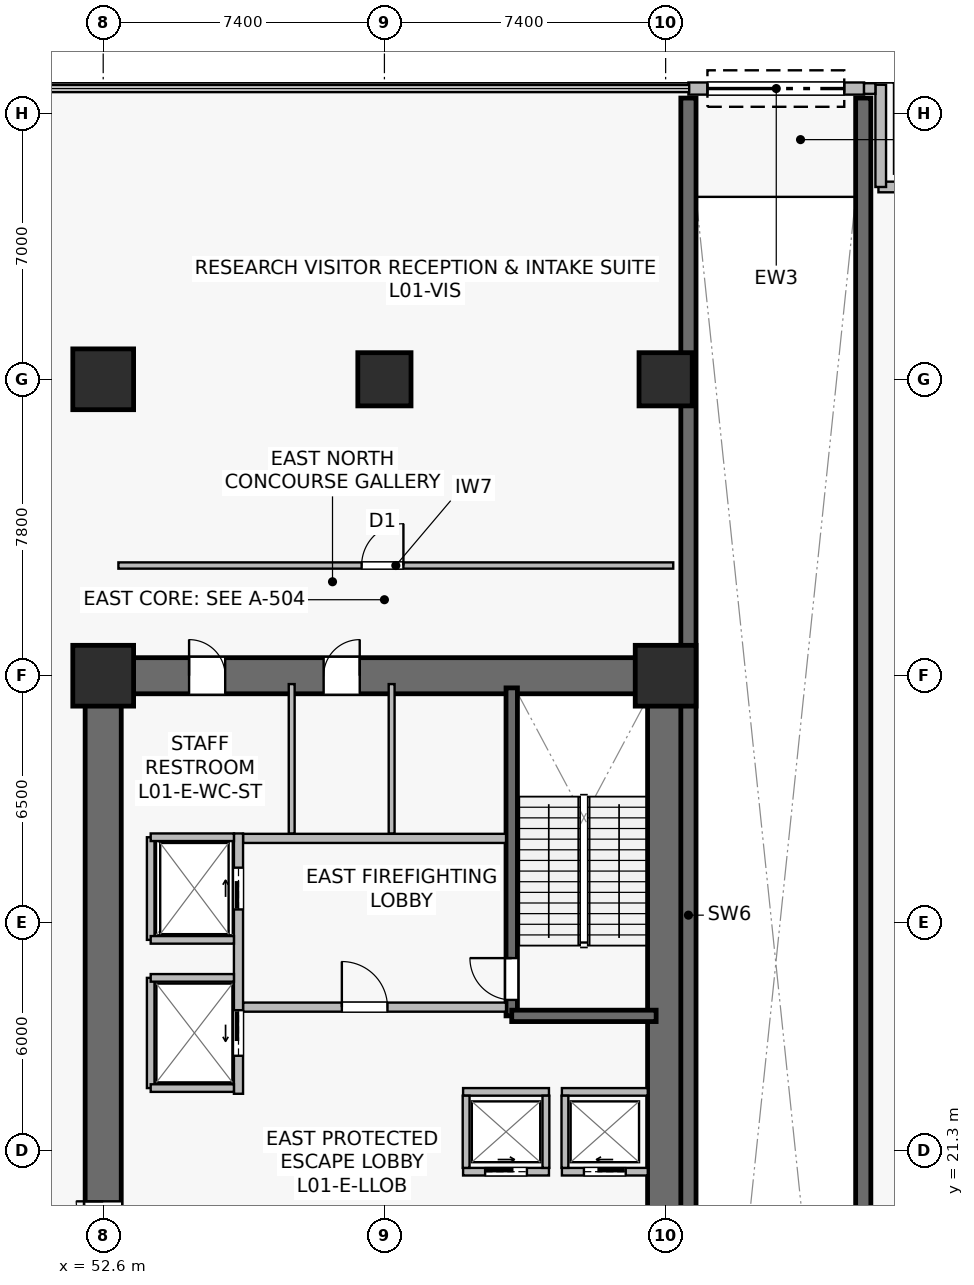
"""IFC4 building model, lengths in metres.
Left out: names, types, materials, properties, quantities, classifications, styles, units other than length and angle.
Written with IfcOpenShell. Run it as: python <this file> out.ifc"""

import sys

from ifc_helpers import new_model, si_unit, direction, frame, frame_2d, origin, origin_2d, place, context, subcontext, project, spatial, rectangle, extrude, source, transform, mapped, element, fill, save


model = new_model("IFC4")
c1 = context("Model", 3, precision=1e-05, world=origin(), true_north=direction((0.0, 1.0)))
c2 = subcontext(c1, "Body", "Model", "MODEL_VIEW")
j1 = project(units=[si_unit("LENGTHUNIT", "METRE"), si_unit("PLANEANGLEUNIT", "RADIAN")], contexts=[c1])
p1 = place(None, origin())
s1 = spatial("IfcSite", under=j1, at=p1, CompositionType="ELEMENT")
p2 = place(p1, origin())
s2 = spatial("IfcBuilding", under=s1, at=p2, CompositionType="ELEMENT")
p3 = place(p2, origin())
s3 = spatial("IfcBuildingStorey", under=s2, at=p3, CompositionType="ELEMENT", Elevation=0.0)
p4 = place(p3, frame((52.125, 33.8, 0.0), z_axis=(0.0, 0.0, 1.0), x_axis=(1.0, 0.0, 0.0)))
e1 = element("IfcWall", 1, at=p4, inside=s3, PredefinedType="SHEAR", context=c2, shape_type="SweptSolid", body=[
    extrude(rectangle(XDim=15.75, YDim=0.95, at=frame_2d((7.875, 0.0))), origin(), (0.0, 0.0, 1.0), 5.05),
])
p5 = place(p4, frame((6.275, 0.0, 0.0)))
e2 = element("IfcOpeningElement", 2, at=p5, cuts=e1, PredefinedType="OPENING", context=c2, shape_type="SweptSolid", body=[
    extrude(rectangle(XDim=0.95, YDim=2.15, at=frame_2d((0.475, 1.075))), frame((0.0, 0.485, 0.0), z_axis=(0.0, -1.0, 0.0), x_axis=(1.0, 0.0, 0.0)), (0.0, 0.0, 1.0), 0.97),
])
p6 = place(p4, frame((2.735, 0.0, 0.0)))
e3 = element("IfcOpeningElement", 3, at=p6, cuts=e1, PredefinedType="OPENING", context=c2, shape_type="SweptSolid", body=[
    extrude(rectangle(XDim=0.95, YDim=2.15, at=frame_2d((0.475, 1.075))), frame((0.0, 0.485, 0.0), z_axis=(0.0, -1.0, 0.0), x_axis=(1.0, 0.0, 0.0)), (0.0, 0.0, 1.0), 0.97),
])
p7 = place(p3, frame((52.6, 15.275, 0.0), z_axis=(0.0, 0.0, 1.0), x_axis=(0.0, 1.0, 0.0)))
e4 = element("IfcWall", 4, at=p7, inside=s3, PredefinedType="SHEAR", context=c2, shape_type="SweptSolid", body=[
    extrude(rectangle(XDim=18.05, YDim=0.95, at=frame_2d((9.025, 0.0))), origin(), (0.0, 0.0, 1.0), 5.05),
])
p8 = place(p7, frame((3.275, 0.0, 0.0)))
e5 = element("IfcOpeningElement", 5, at=p8, cuts=e4, PredefinedType="OPENING", context=c2, shape_type="SweptSolid", body=[
    extrude(rectangle(XDim=1.42, YDim=2.2, at=frame_2d((0.71, 1.1))), frame((0.0, 0.485, 0.0), z_axis=(0.0, -1.0, 0.0), x_axis=(1.0, 0.0, 0.0)), (0.0, 0.0, 1.0), 0.97),
])
p9 = place(p3, frame((67.4, 15.275, 0.0), z_axis=(0.0, 0.0, 1.0), x_axis=(0.0, 1.0, 0.0)))
e6 = element("IfcWall", 6, at=p9, inside=s3, PredefinedType="SHEAR", context=c2, shape_type="SweptSolid", body=[
    extrude(rectangle(XDim=18.05, YDim=0.95, at=frame_2d((9.025, 0.0))), origin(), (0.0, 0.0, 1.0), 5.05),
])
p10 = place(p3, frame((63.35, 24.85, 0.0), z_axis=(0.0, 0.0, 1.0), x_axis=(0.0, 1.0, 0.0)))
e7 = element("IfcWall", 7, at=p10, inside=s3, PredefinedType="SHEAR", context=c2, shape_type="SweptSolid", body=[
    extrude(rectangle(XDim=8.63, YDim=0.3, at=frame_2d((4.315, 0.0))), origin(), (0.0, 0.0, 1.0), 5.05),
])
p11 = place(p10, frame((0.42, 0.0, 0.0)))
e8 = element("IfcOpeningElement", 8, at=p11, cuts=e7, PredefinedType="OPENING", context=c2, shape_type="SweptSolid", body=[
    extrude(rectangle(XDim=1.1, YDim=2.15, at=frame_2d((0.55, 1.075))), frame((0.0, 0.16, 0.0), z_axis=(0.0, -1.0, 0.0), x_axis=(1.0, 0.0, 0.0)), (0.0, 0.0, 1.0), 0.32),
])
p12 = place(p3, frame((63.35, 24.85, 0.0), z_axis=(0.0, 0.0, 1.0), x_axis=(1.0, 0.0, 0.0)))
e9 = element("IfcWall", 9, at=p12, inside=s3, PredefinedType="SHEAR", context=c2, shape_type="SweptSolid", body=[
    extrude(rectangle(XDim=3.8, YDim=0.3, at=frame_2d((1.9, 0.0))), origin(), (0.0, 0.0, 1.0), 5.05),
])
for number, where, z_axis, x_axis in (
    (10, (68.0, 6.0, 0.0), (0.0, 0.0, 1.0), (0.0, 1.0, 0.0)),
    (11, (72.6, 6.0, 0.0), (0.0, 0.0, 1.0), (0.0, 1.0, 0.0)),
):
    element("IfcWall", number, at=place(p3, frame(where, z_axis=z_axis, x_axis=x_axis)), inside=s3, PredefinedType="SHEAR", context=c2, shape_type="SweptSolid", body=[
        extrude(rectangle(XDim=43.0, YDim=0.4, at=frame_2d((21.5, 0.0))), origin(), (0.0, 0.0, 1.0), 5.05),
    ])
m1 = source(origin(), c2, "Body", "SweptSolid", [
    extrude(rectangle(XDim=1.6, YDim=1.6, at=origin_2d()), origin(), (0.0, 0.0, 1.0), 5.4),
])
for number, where, z_axis, x_axis in (
    (12, (52.6, 33.8, 0.0), (0.0, 0.0, 1.0), (1.0, 0.0, 0.0)),
    (13, (67.4, 33.8, 0.0), (0.0, 0.0, 1.0), (1.0, 0.0, 0.0)),
    (14, (52.6, 41.6, 0.0), (0.0, 0.0, 1.0), (1.0, 0.0, 0.0)),
):
    element("IfcColumn", number, at=place(p3, frame(where, z_axis=z_axis, x_axis=x_axis)), inside=s3, PredefinedType="COLUMN", context=c2, shape_type="MappedRepresentation", body=[
        mapped(m1, transform((0.0, 0.0, 0.0), scale=1.0)),
    ])
m2 = source(origin(), c2, "Body", "SweptSolid", [
    extrude(rectangle(XDim=1.4, YDim=1.4, at=origin_2d()), origin(), (0.0, 0.0, 1.0), 5.4),
])
for number, where, z_axis, x_axis in (
    (15, (60.0, 41.6, 0.0), (0.0, 0.0, 1.0), (1.0, 0.0, 0.0)),
    (16, (67.4, 41.6, 0.0), (0.0, 0.0, 1.0), (1.0, 0.0, 0.0)),
):
    element("IfcColumn", number, at=place(p3, frame(where, z_axis=z_axis, x_axis=x_axis)), inside=s3, PredefinedType="COLUMN", context=c2, shape_type="MappedRepresentation", body=[
        mapped(m2, transform((0.0, 0.0, 0.0), scale=1.0)),
    ])
p13 = place(p3, frame((68.0, 49.25, 0.0), z_axis=(0.0, 0.0, 1.0), x_axis=(1.0, 0.0, 0.0)))
e17 = element("IfcWall", 17, at=p13, inside=s3, PredefinedType="STANDARD", context=c2, shape_type="SweptSolid", body=[
    extrude(rectangle(XDim=4.622, YDim=0.32, at=frame_2d((2.311, 0.0))), origin(), (0.0, 0.0, 1.0), 5.05),
])
p14 = place(p13, frame((0.5, 0.0, 0.0)))
e18 = element("IfcOpeningElement", 18, at=p14, cuts=e17, PredefinedType="OPENING", context=c2, shape_type="SweptSolid", body=[
    extrude(rectangle(XDim=3.6, YDim=2.8, at=frame_2d((1.8, 1.4))), frame((0.0, 0.17, 0.0), z_axis=(0.0, -1.0, 0.0), x_axis=(1.0, 0.0, 0.0)), (0.0, 0.0, 1.0), 0.34),
])
p15 = place(p3, frame((75.75, 46.66, 0.0), z_axis=(0.0, 0.0, 1.0), x_axis=(-1.0, 0.0, 0.0)))
e19 = element("IfcWall", 19, at=p15, inside=s3, PredefinedType="STANDARD", context=c2, shape_type="SweptSolid", body=[
    extrude(rectangle(XDim=2.75, YDim=0.28, at=frame_2d((1.375, 0.0))), origin(), (0.0, 0.0, 1.0), 5.05),
])
p16 = place(p3, frame((73.06, 46.66, 0.0), z_axis=(0.0, 0.0, 1.0), x_axis=(0.0, 1.0, 0.0)))
e20 = element("IfcWall", 20, at=p16, inside=s3, PredefinedType="STANDARD", context=c2, shape_type="SweptSolid", body=[
    extrude(rectangle(XDim=2.69, YDim=0.28, at=frame_2d((1.345, 0.0))), origin(), (0.0, 0.0, 1.0), 5.05),
])
p17 = place(p3, frame((72.62, 49.25, 0.0), z_axis=(0.0, 0.0, 1.0), x_axis=(1.0, 0.0, 0.0)))
e21 = element("IfcWall", 21, at=p17, inside=s3, PredefinedType="STANDARD", context=c2, shape_type="SweptSolid", body=[
    extrude(rectangle(XDim=0.3, YDim=0.28, at=frame_2d((0.15, 0.0))), origin(), (0.0, 0.0, 1.0), 5.05),
])
p18 = place(p3, frame((56.28, 25.08, 0.0), z_axis=(0.0, 0.0, 1.0), x_axis=(1.0, 0.0, 0.0)))
e22 = element("IfcWall", 22, at=p18, inside=s3, PredefinedType="SOLIDWALL", context=c2, shape_type="SweptSolid", body=[
    extrude(rectangle(XDim=6.92, YDim=0.24, at=frame_2d((3.46, 0.0))), origin(), (0.0, 0.0, 1.0), 4.335),
])
p19 = place(p18, frame((2.6, 0.0, 0.0)))
e23 = element("IfcOpeningElement", 23, at=p19, cuts=e22, PredefinedType="OPENING", context=c2, shape_type="SweptSolid", body=[
    extrude(rectangle(XDim=1.2, YDim=2.16, at=frame_2d((0.6, 1.08))), frame((0.0, 0.13, 0.0), z_axis=(0.0, -1.0, 0.0), x_axis=(1.0, 0.0, 0.0)), (0.0, 0.0, 1.0), 0.26),
])
p20 = place(p3, frame((56.28, 29.52, 0.0), z_axis=(0.0, 0.0, 1.0), x_axis=(1.0, 0.0, 0.0)))
e24 = element("IfcWall", 24, at=p20, inside=s3, PredefinedType="SOLIDWALL", context=c2, shape_type="SweptSolid", body=[
    extrude(rectangle(XDim=6.92, YDim=0.24, at=frame_2d((3.46, 0.0))), origin(), (0.0, 0.0, 1.0), 4.335),
])
p21 = place(p3, frame((56.16, 22.8, 0.0), z_axis=(0.0, 0.0, 1.0), x_axis=(0.0, 1.0, 0.0)))
e25 = element("IfcWall", 25, at=p21, inside=s3, PredefinedType="SOLIDWALL", context=c2, shape_type="SweptSolid", body=[
    extrude(rectangle(XDim=6.85, YDim=0.24, at=frame_2d((3.425, 0.0))), origin(), (0.0, 0.0, 1.0), 4.135),
])
p22 = place(p21, frame((4.85, 0.0, 0.0)))
e26 = element("IfcOpeningElement", 26, at=p22, cuts=e25, PredefinedType="OPENING", context=c2, shape_type="SweptSolid", body=[
    extrude(rectangle(XDim=1.1, YDim=2.22, at=frame_2d((0.55, 1.11))), frame((0.0, 0.13, 0.0), z_axis=(0.0, -1.0, 0.0), x_axis=(1.0, 0.0, 0.0)), (0.0, 0.0, 1.0), 0.26),
])
p23 = place(p21, frame((1.0, 0.0, 0.0)))
e27 = element("IfcOpeningElement", 27, at=p23, cuts=e25, PredefinedType="OPENING", context=c2, shape_type="SweptSolid", body=[
    extrude(rectangle(XDim=1.2, YDim=2.22, at=frame_2d((0.6, 1.11))), frame((0.0, 0.13, 0.0), z_axis=(0.0, -1.0, 0.0), x_axis=(1.0, 0.0, 0.0)), (0.0, 0.0, 1.0), 0.26),
])
p24 = place(p3, frame((64.67, 20.75, 0.0), z_axis=(0.0, 0.0, 1.0), x_axis=(1.0, 0.0, 0.0)))
e28 = element("IfcWall", 28, at=p24, inside=s3, PredefinedType="SOLIDWALL", context=c2, shape_type="SweptSolid", body=[
    extrude(rectangle(XDim=2.26, YDim=0.2, at=frame_2d((1.13, 0.0))), origin(), (0.0, 0.0, 1.0), 5.05),
])
p25 = place(p24, frame((0.58, 0.0, 0.0)))
e29 = element("IfcOpeningElement", 29, at=p25, cuts=e28, PredefinedType="OPENING", context=c2, shape_type="SweptSolid", body=[
    extrude(rectangle(XDim=1.1, YDim=2.22, at=frame_2d((0.55, 1.11))), frame((0.0, 0.11, 0.0), z_axis=(0.0, -1.0, 0.0), x_axis=(1.0, 0.0, 0.0)), (0.0, 0.0, 1.0), 0.22),
])
p26 = place(p3, frame((64.67, 22.85, 0.0), z_axis=(0.0, 0.0, 1.0), x_axis=(1.0, 0.0, 0.0)))
e30 = element("IfcWall", 30, at=p26, inside=s3, PredefinedType="SOLIDWALL", context=c2, shape_type="SweptSolid", body=[
    extrude(rectangle(XDim=2.26, YDim=0.2, at=frame_2d((1.13, 0.0))), origin(), (0.0, 0.0, 1.0), 5.05),
])
p27 = place(p3, frame((64.75, 20.85, 0.0), z_axis=(0.0, 0.0, 1.0), x_axis=(0.0, 1.0, 0.0)))
e31 = element("IfcWall", 31, at=p27, inside=s3, PredefinedType="SOLIDWALL", context=c2, shape_type="SweptSolid", body=[
    extrude(rectangle(XDim=1.9, YDim=0.18, at=frame_2d((0.95, 0.0))), origin(), (0.0, 0.0, 1.0), 5.05),
])
p28 = place(p3, frame((62.07, 20.75, 0.0), z_axis=(0.0, 0.0, 1.0), x_axis=(1.0, 0.0, 0.0)))
e32 = element("IfcWall", 32, at=p28, inside=s3, PredefinedType="SOLIDWALL", context=c2, shape_type="SweptSolid", body=[
    extrude(rectangle(XDim=2.26, YDim=0.2, at=frame_2d((1.13, 0.0))), origin(), (0.0, 0.0, 1.0), 5.05),
])
p29 = place(p28, frame((0.58, 0.0, 0.0)))
e33 = element("IfcOpeningElement", 33, at=p29, cuts=e32, PredefinedType="OPENING", context=c2, shape_type="SweptSolid", body=[
    extrude(rectangle(XDim=1.1, YDim=2.22, at=frame_2d((0.55, 1.11))), frame((0.0, 0.11, 0.0), z_axis=(0.0, -1.0, 0.0), x_axis=(1.0, 0.0, 0.0)), (0.0, 0.0, 1.0), 0.22),
])
p30 = place(p3, frame((62.07, 22.85, 0.0), z_axis=(0.0, 0.0, 1.0), x_axis=(1.0, 0.0, 0.0)))
e34 = element("IfcWall", 34, at=p30, inside=s3, PredefinedType="SOLIDWALL", context=c2, shape_type="SweptSolid", body=[
    extrude(rectangle(XDim=2.26, YDim=0.2, at=frame_2d((1.13, 0.0))), origin(), (0.0, 0.0, 1.0), 5.05),
])
for number, where, z_axis, x_axis in (
    (35, (62.15, 20.85, 0.0), (0.0, 0.0, 1.0), (0.0, 1.0, 0.0)),
    (36, (64.25, 20.85, 0.0), (0.0, 0.0, 1.0), (0.0, 1.0, 0.0)),
):
    element("IfcWall", number, at=place(p3, frame(where, z_axis=z_axis, x_axis=x_axis)), inside=s3, PredefinedType="SOLIDWALL", context=c2, shape_type="SweptSolid", body=[
        extrude(rectangle(XDim=1.9, YDim=0.18, at=frame_2d((0.95, 0.0))), origin(), (0.0, 0.0, 1.0), 5.05),
    ])
p31 = place(p3, frame((53.85, 26.85, 0.0), z_axis=(0.0, 0.0, 1.0), x_axis=(0.0, 1.0, 0.0)))
e37 = element("IfcWall", 37, at=p31, inside=s3, PredefinedType="SOLIDWALL", context=c2, shape_type="SweptSolid", body=[
    extrude(rectangle(XDim=2.7, YDim=0.2, at=frame_2d((1.35, 0.0))), origin(), (0.0, 0.0, 1.0), 5.05),
])
p32 = place(p3, frame((53.85, 29.55, 0.0), z_axis=(0.0, 0.0, 1.0), x_axis=(1.0, 0.0, 0.0)))
e38 = element("IfcWall", 38, at=p32, inside=s3, PredefinedType="SOLIDWALL", context=c2, shape_type="SweptSolid", body=[
    extrude(rectangle(XDim=2.19, YDim=0.2, at=frame_2d((1.095, 0.0))), origin(), (0.0, 0.0, 1.0), 5.05),
])
p33 = place(p3, frame((53.85, 26.85, 0.0), z_axis=(0.0, 0.0, 1.0), x_axis=(1.0, 0.0, 0.0)))
e39 = element("IfcWall", 39, at=p33, inside=s3, PredefinedType="SOLIDWALL", context=c2, shape_type="SweptSolid", body=[
    extrude(rectangle(XDim=2.19, YDim=0.2, at=frame_2d((1.095, 0.0))), origin(), (0.0, 0.0, 1.0), 4.447),
])
p34 = place(p3, frame((53.85, 22.95, 0.0), z_axis=(0.0, 0.0, 1.0), x_axis=(0.0, 1.0, 0.0)))
e40 = element("IfcWall", 40, at=p34, inside=s3, PredefinedType="SOLIDWALL", context=c2, shape_type="SweptSolid", body=[
    extrude(rectangle(XDim=2.9, YDim=0.2, at=frame_2d((1.45, 0.0))), origin(), (0.0, 0.0, 1.0), 4.135),
])
for number, where, z_axis, x_axis in (
    (41, (53.85, 25.85, 0.0), (0.0, 0.0, 1.0), (1.0, 0.0, 0.0)),
    (42, (53.85, 22.95, 0.0), (0.0, 0.0, 1.0), (1.0, 0.0, 0.0)),
):
    element("IfcWall", number, at=place(p3, frame(where, z_axis=z_axis, x_axis=x_axis)), inside=s3, PredefinedType="SOLIDWALL", context=c2, shape_type="SweptSolid", body=[
        extrude(rectangle(XDim=2.19, YDim=0.2, at=frame_2d((1.095, 0.0))), origin(), (0.0, 0.0, 1.0), 5.05),
    ])
p35 = place(p3, frame((60.19, 29.65, 0.0), z_axis=(0.0, 0.0, 1.0), x_axis=(0.0, 1.0, 0.0)))
e43 = element("IfcWall", 43, at=p35, inside=s3, PredefinedType="PLUMBINGWALL", context=c2, shape_type="SweptSolid", body=[
    extrude(rectangle(XDim=3.93, YDim=0.155, at=frame_2d((1.965, 0.0))), origin(), (0.0, 0.0, 1.0), 4.335),
])
p36 = place(p3, frame((57.56, 29.65, 0.0), z_axis=(0.0, 0.0, 1.0), x_axis=(0.0, 1.0, 0.0)))
e44 = element("IfcWall", 44, at=p36, inside=s3, PredefinedType="PLUMBINGWALL", context=c2, shape_type="SweptSolid", body=[
    extrude(rectangle(XDim=3.93, YDim=0.155, at=frame_2d((1.965, 0.0))), origin(), (0.0, 0.0, 1.0), 5.05),
])
p37 = place(p3, frame((53.0, 36.7, 0.0), z_axis=(0.0, 0.0, 1.0), x_axis=(1.0, 0.0, 0.0)))
e45 = element("IfcWall", 45, at=p37, inside=s3, PredefinedType="PARTITIONING", context=c2, shape_type="SweptSolid", body=[
    extrude(rectangle(XDim=14.6, YDim=0.165, at=frame_2d((7.3, 0.0))), origin(), (0.0, 0.0, 1.0), 4.335),
])
p38 = place(p37, frame((6.4, 0.0, 0.0)))
e46 = element("IfcOpeningElement", 46, at=p38, cuts=e45, PredefinedType="OPENING", context=c2, shape_type="SweptSolid", body=[
    extrude(rectangle(XDim=1.1, YDim=2.18, at=frame_2d((0.55, 1.09))), frame((0.0, 0.093, 0.0), z_axis=(0.0, -1.0, 0.0), x_axis=(1.0, 0.0, 0.0)), (0.0, 0.0, 1.0), 0.185),
])
m3 = source(origin(), c2, "Body", "SweptSolid", [
    extrude(rectangle(XDim=3.6, YDim=2.8, at=frame_2d((1.8, 1.4))), frame((0.0, 0.025, 0.0), z_axis=(0.0, -1.0, 0.0), x_axis=(1.0, 0.0, 0.0)), (0.0, 0.0, 1.0), 0.05),
])
p39 = place(p14, origin())
e47 = element("IfcDoor", 47, at=p39, inside=s3, OperationType="ROLLINGUP", PredefinedType="GATE", context=c2, shape_type="MappedRepresentation", body=[
    mapped(m3, transform((0.0, 0.0, 0.0), scale=1.0)),
])
fill(e18, e47)
m4 = source(origin(), c2, "Body", "SweptSolid", [
    extrude(rectangle(XDim=1.1, YDim=2.15, at=frame_2d((0.55, 1.075))), frame((0.0, 0.025, 0.0), z_axis=(0.0, -1.0, 0.0), x_axis=(1.0, 0.0, 0.0)), (0.0, 0.0, 1.0), 0.05),
])
p40 = place(p11, origin())
e48 = element("IfcDoor", 48, at=p40, inside=s3, OperationType="SINGLE_SWING_RIGHT", PredefinedType="DOOR", context=c2, shape_type="MappedRepresentation", body=[
    mapped(m4, transform((0.0, 0.0, 0.0), scale=1.0)),
])
fill(e8, e48)
m5 = source(origin(), c2, "Body", "SweptSolid", [
    extrude(rectangle(XDim=1.2, YDim=2.16, at=frame_2d((0.6, 1.08))), frame((0.0, 0.025, 0.0), z_axis=(0.0, -1.0, 0.0), x_axis=(1.0, 0.0, 0.0)), (0.0, 0.0, 1.0), 0.05),
])
p41 = place(p19, origin())
e49 = element("IfcDoor", 49, at=p41, inside=s3, OperationType="SINGLE_SWING_LEFT", PredefinedType="DOOR", context=c2, shape_type="MappedRepresentation", body=[
    mapped(m5, transform((0.0, 0.0, 0.0), scale=1.0)),
])
fill(e23, e49)
m6 = source(origin(), c2, "Body", "SweptSolid", [
    extrude(rectangle(XDim=1.1, YDim=2.22, at=frame_2d((0.55, 1.11))), frame((0.0, 0.025, 0.0), z_axis=(0.0, -1.0, 0.0), x_axis=(1.0, 0.0, 0.0)), (0.0, 0.0, 1.0), 0.05),
])
p42 = place(p25, origin())
e50 = element("IfcDoor", 50, at=p42, inside=s3, OperationType="SLIDING_TO_LEFT", PredefinedType="USERDEFINED", context=c2, shape_type="MappedRepresentation", body=[
    mapped(m6, transform((0.0, 0.0, 0.0), scale=1.0)),
])
fill(e29, e50)
p43 = place(p29, origin())
e51 = element("IfcDoor", 51, at=p43, inside=s3, OperationType="SLIDING_TO_RIGHT", PredefinedType="USERDEFINED", context=c2, shape_type="MappedRepresentation", body=[
    mapped(m6, transform((0.0, 0.0, 0.0), scale=1.0)),
])
fill(e33, e51)
p44 = place(p22, origin())
e52 = element("IfcDoor", 52, at=p44, inside=s3, OperationType="SLIDING_TO_RIGHT", PredefinedType="USERDEFINED", context=c2, shape_type="MappedRepresentation", body=[
    mapped(m6, transform((0.0, 0.0, 0.0), scale=1.0)),
])
fill(e26, e52)
m7 = source(origin(), c2, "Body", "SweptSolid", [
    extrude(rectangle(XDim=1.2, YDim=2.22, at=frame_2d((0.6, 1.11))), frame((0.0, 0.025, 0.0), z_axis=(0.0, -1.0, 0.0), x_axis=(1.0, 0.0, 0.0)), (0.0, 0.0, 1.0), 0.05),
])
p45 = place(p23, origin())
e53 = element("IfcDoor", 53, at=p45, inside=s3, OperationType="SLIDING_TO_LEFT", PredefinedType="USERDEFINED", context=c2, shape_type="MappedRepresentation", body=[
    mapped(m7, transform((0.0, 0.0, 0.0), scale=1.0)),
])
fill(e27, e53)
m8 = source(origin(), c2, "Body", "SweptSolid", [
    extrude(rectangle(XDim=1.42, YDim=2.2, at=frame_2d((0.71, 1.1))), frame((0.0, 0.025, 0.0), z_axis=(0.0, -1.0, 0.0), x_axis=(1.0, 0.0, 0.0)), (0.0, 0.0, 1.0), 0.05),
])
p46 = place(p8, origin())
e54 = element("IfcDoor", 54, at=p46, inside=s3, OperationType="DOUBLE_DOOR_SINGLE_SWING", PredefinedType="DOOR", context=c2, shape_type="MappedRepresentation", body=[
    mapped(m8, transform((0.0, 0.0, 0.0), scale=1.0)),
])
fill(e5, e54)
m9 = source(origin(), c2, "Body", "SweptSolid", [
    extrude(rectangle(XDim=0.95, YDim=2.15, at=frame_2d((0.475, 1.075))), frame((0.0, 0.025, 0.0), z_axis=(0.0, -1.0, 0.0), x_axis=(1.0, 0.0, 0.0)), (0.0, 0.0, 1.0), 0.05),
])
p47 = place(p5, origin())
e55 = element("IfcDoor", 55, at=p47, inside=s3, OperationType="SINGLE_SWING_RIGHT", PredefinedType="DOOR", context=c2, shape_type="MappedRepresentation", body=[
    mapped(m9, transform((0.0, 0.0, 0.0), scale=1.0)),
])
fill(e2, e55)
p48 = place(p6, origin())
e56 = element("IfcDoor", 56, at=p48, inside=s3, OperationType="SINGLE_SWING_LEFT", PredefinedType="DOOR", context=c2, shape_type="MappedRepresentation", body=[
    mapped(m9, transform((0.0, 0.0, 0.0), scale=1.0)),
])
fill(e3, e56)
m10 = source(origin(), c2, "Body", "SweptSolid", [
    extrude(rectangle(XDim=1.1, YDim=2.18, at=frame_2d((0.55, 1.09))), frame((0.0, 0.025, 0.0), z_axis=(0.0, -1.0, 0.0), x_axis=(1.0, 0.0, 0.0)), (0.0, 0.0, 1.0), 0.05),
])
p49 = place(p38, origin())
e57 = element("IfcDoor", 57, at=p49, inside=s3, OperationType="SINGLE_SWING_RIGHT", PredefinedType="DOOR", context=c2, shape_type="MappedRepresentation", body=[
    mapped(m10, transform((0.0, 0.0, 0.0), scale=1.0)),
])
fill(e46, e57)
save(model, sys.argv[1])
